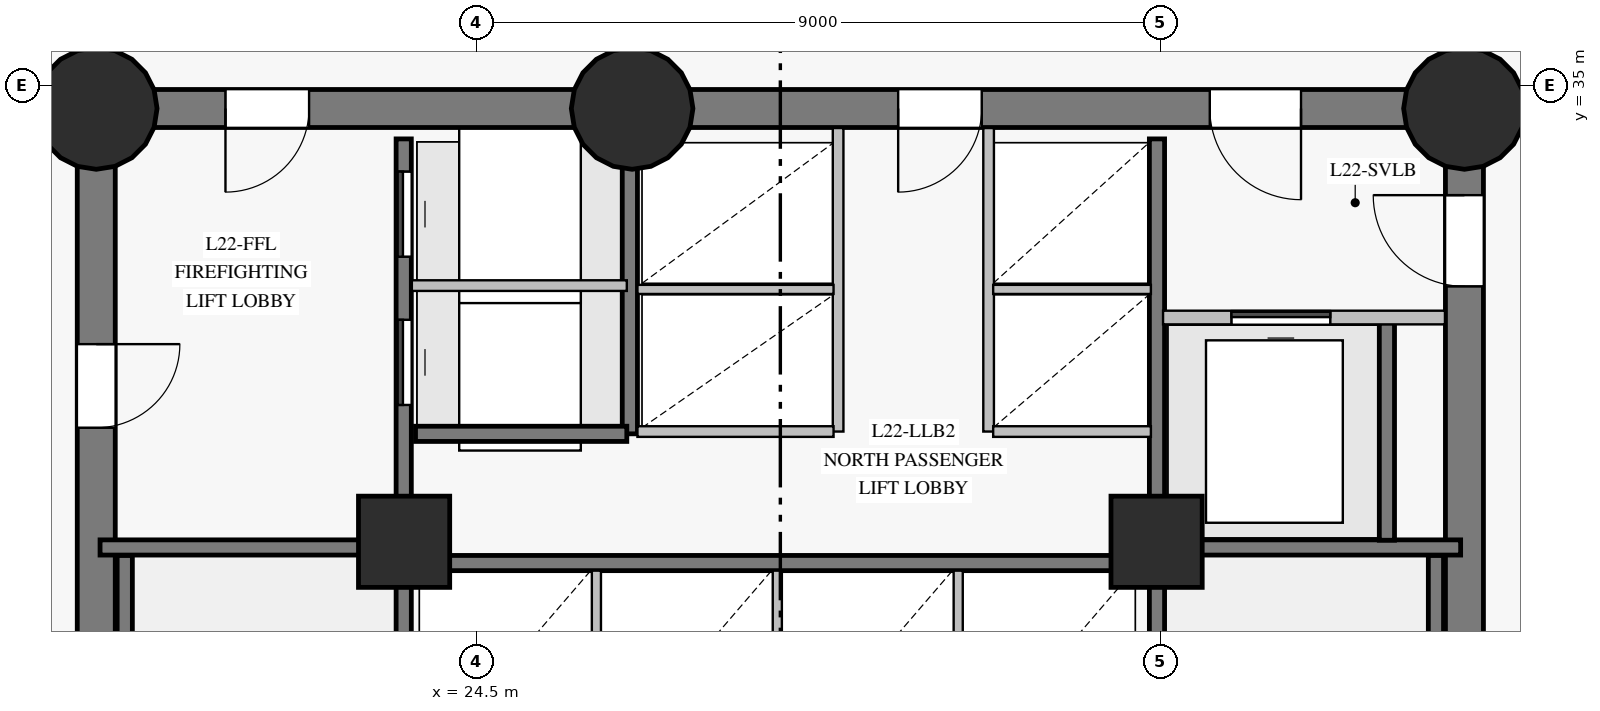
"""IFC4 building model, lengths in metres.
Left out: names, types, materials, properties, quantities, classifications, styles, units other than length and angle.
Written with IfcOpenShell. Run it as: python <this file> out.ifc"""

import sys

from ifc_helpers import new_model, si_unit, direction, frame, frame_2d, origin, origin_with_axes, origin_2d, place, context, subcontext, project, spatial, rectangle, circle, extrude, source, transform, mapped, element, fill, save


model = new_model("IFC4")
c1 = context("Model", 3, precision=1e-05, world=origin(), true_north=direction((0.0, 1.0)))
c2 = subcontext(c1, "Body", "Model", "MODEL_VIEW")
j1 = project(units=[si_unit("LENGTHUNIT", "METRE"), si_unit("PLANEANGLEUNIT", "RADIAN")], contexts=[c1])
p1 = place(None, origin())
s1 = spatial("IfcSite", under=j1, at=p1, CompositionType="ELEMENT")
p2 = place(p1, origin())
s2 = spatial("IfcBuilding", under=s1, at=p2, CompositionType="ELEMENT")
p3 = place(p2, frame((0.0, 0.0, 84.1)))
s3 = spatial("IfcBuildingStorey", under=s2, at=p3, CompositionType="ELEMENT", Elevation=84.1)
p4 = place(p3, frame((37.5, 18.3, 0.0), z_axis=(0.0, 0.0, 1.0), x_axis=(0.0, 1.0, 0.0)))
e1 = element("IfcWall", 1, at=p4, inside=s3, PredefinedType="SHEAR", context=c2, shape_type="SweptSolid", body=[
    extrude(rectangle(XDim=16.4, YDim=0.5, at=frame_2d((8.2, 0.0))), origin(), (0.0, 0.0, 1.0), 3.325),
])
p5 = place(p4, frame((14.06, 0.0, 0.0)))
e2 = element("IfcOpeningElement", 2, at=p5, cuts=e1, PredefinedType="OPENING", context=c2, shape_type="SweptSolid", body=[
    extrude(rectangle(XDim=1.2, YDim=2.15, at=frame_2d((0.6, 1.075))), frame((0.0, 0.26, 0.0), z_axis=(0.0, -1.0, 0.0), x_axis=(1.0, 0.0, 0.0)), (0.0, 0.0, 1.0), 0.52),
])
p6 = place(p3, frame((37.5, 34.7, 0.0), z_axis=(0.0, 0.0, 1.0), x_axis=(-1.0, 0.0, 0.0)))
e3 = element("IfcWall", 3, at=p6, inside=s3, PredefinedType="SHEAR", context=c2, shape_type="SweptSolid", body=[
    extrude(rectangle(XDim=10.95, YDim=0.5, at=frame_2d((5.475, 0.0))), origin(), (0.0, 0.0, 1.0), 3.325),
])
p7 = place(p6, frame((2.15, 0.0, 0.0)))
e4 = element("IfcOpeningElement", 4, at=p7, cuts=e3, PredefinedType="OPENING", context=c2, shape_type="SweptSolid", body=[
    extrude(rectangle(XDim=1.2, YDim=2.15, at=frame_2d((0.6, 1.075))), frame((0.0, 0.26, 0.0), z_axis=(0.0, -1.0, 0.0), x_axis=(1.0, 0.0, 0.0)), (0.0, 0.0, 1.0), 0.52),
])
p8 = place(p6, frame((6.35, 0.0, 0.0)))
e5 = element("IfcOpeningElement", 5, at=p8, cuts=e3, PredefinedType="OPENING", context=c2, shape_type="SweptSolid", body=[
    extrude(rectangle(XDim=1.1, YDim=2.15, at=frame_2d((0.55, 1.075))), frame((0.0, 0.26, 0.0), z_axis=(0.0, -1.0, 0.0), x_axis=(1.0, 0.0, 0.0)), (0.0, 0.0, 1.0), 0.52),
])
p9 = place(p3, frame((26.55, 34.7, 0.0), z_axis=(0.0, 0.0, 1.0), x_axis=(-1.0, 0.0, 0.0)))
e6 = element("IfcWall", 6, at=p9, inside=s3, PredefinedType="SHEAR", context=c2, shape_type="SweptSolid", body=[
    extrude(rectangle(XDim=7.05, YDim=0.5, at=frame_2d((3.525, 0.0))), origin(), (0.0, 0.0, 1.0), 3.325),
])
p10 = place(p9, frame((4.25, 0.0, 0.0)))
e7 = element("IfcOpeningElement", 7, at=p10, cuts=e6, PredefinedType="OPENING", context=c2, shape_type="SweptSolid", body=[
    extrude(rectangle(XDim=1.1, YDim=2.15, at=frame_2d((0.55, 1.075))), frame((0.0, 0.26, 0.0), z_axis=(0.0, -1.0, 0.0), x_axis=(1.0, 0.0, 0.0)), (0.0, 0.0, 1.0), 0.52),
])
p11 = place(p3, frame((19.5, 34.7, 0.0), z_axis=(0.0, 0.0, 1.0), x_axis=(0.0, -1.0, 0.0)))
e8 = element("IfcWall", 8, at=p11, inside=s3, PredefinedType="SHEAR", context=c2, shape_type="SweptSolid", body=[
    extrude(rectangle(XDim=16.4, YDim=0.5, at=frame_2d((8.2, 0.0))), origin(), (0.0, 0.0, 1.0), 3.325),
])
p12 = place(p11, frame((3.1, 0.0, 0.0)))
e9 = element("IfcOpeningElement", 9, at=p12, cuts=e8, PredefinedType="OPENING", context=c2, shape_type="SweptSolid", body=[
    extrude(rectangle(XDim=1.1, YDim=2.15, at=frame_2d((0.55, 1.075))), frame((0.0, 0.26, 0.0), z_axis=(0.0, -1.0, 0.0), x_axis=(1.0, 0.0, 0.0)), (0.0, 0.0, 1.0), 0.52),
])
m1 = source(origin_with_axes(), c2, "Body", "SweptSolid", [
    extrude(circle(Radius=0.8, at=origin_2d()), origin(), (0.0, 0.0, 1.0), 3.6),
])
for number, where, z_axis, x_axis in (
    (10, (19.5, 34.7, 0.0), (0.0, 0.0, 1.0), (1.0, 0.0, 0.0)),
    (11, (26.55, 34.7, 0.0), (0.0, 0.0, 1.0), (1.0, 0.0, 0.0)),
    (12, (37.5, 34.7, 0.0), (0.0, 0.0, 1.0), (1.0, 0.0, 0.0)),
):
    element("IfcColumn", number, at=place(p3, frame(where, z_axis=z_axis, x_axis=x_axis)), inside=s3, PredefinedType="COLUMN", context=c2, shape_type="MappedRepresentation", body=[
        mapped(m1, transform((0.0, 0.0, 0.0), scale=1.0)),
    ])
m2 = source(origin_with_axes(), c2, "Body", "SweptSolid", [
    extrude(rectangle(XDim=1.2, YDim=1.2, at=origin_2d()), origin(), (0.0, 0.0, 1.0), 3.6),
])
for number, where, z_axis, x_axis in (
    (13, (23.55, 29.0, 0.0), (0.0, 0.0, 1.0), (1.0, 0.0, 0.0)),
    (14, (33.45, 29.0, 0.0), (0.0, 0.0, 1.0), (1.0, 0.0, 0.0)),
):
    element("IfcColumn", number, at=place(p3, frame(where, z_axis=z_axis, x_axis=x_axis)), inside=s3, PredefinedType="COLUMN", context=c2, shape_type="MappedRepresentation", body=[
        mapped(m2, transform((0.0, 0.0, 0.0), scale=1.0)),
    ])
p13 = place(p3, frame((23.545, 18.7, 0.0), z_axis=(0.0, 0.0, 1.0), x_axis=(0.0, 1.0, 0.0)))
e15 = element("IfcWall", 15, at=p13, inside=s3, PredefinedType="SHEAR", context=c2, shape_type="SweptSolid", body=[
    extrude(rectangle(XDim=15.6, YDim=0.2, at=frame_2d((7.8, 0.0))), origin(), (0.0, 0.0, 1.0), 3.325),
])
p14 = place(p13, frame((2.75, 0.0, 0.0)))
e16 = element("IfcOpeningElement", 16, at=p14, cuts=e15, PredefinedType="OPENING", context=c2, shape_type="SweptSolid", body=[
    extrude(rectangle(XDim=1.15, YDim=2.15, at=frame_2d((0.575, 1.075))), frame((0.0, 0.11, 0.0), z_axis=(0.0, -1.0, 0.0), x_axis=(1.0, 0.0, 0.0)), (0.0, 0.0, 1.0), 0.22),
])
p15 = place(p13, frame((0.14, 0.0, 0.0)))
e17 = element("IfcOpeningElement", 17, at=p15, cuts=e15, PredefinedType="OPENING", context=c2, shape_type="SweptSolid", body=[
    extrude(rectangle(XDim=0.88, YDim=2.1, at=frame_2d((0.44, 1.05))), frame((0.0, 0.11, 0.0), z_axis=(0.0, -1.0, 0.0), x_axis=(1.0, 0.0, 0.0)), (0.0, 0.0, 1.0), 0.22),
])
p16 = place(p13, frame((1.36, 0.0, 0.0)))
e18 = element("IfcOpeningElement", 18, at=p16, cuts=e15, PredefinedType="OPENING", context=c2, shape_type="SweptSolid", body=[
    extrude(rectangle(XDim=0.88, YDim=2.1, at=frame_2d((0.44, 1.05))), frame((0.0, 0.11, 0.0), z_axis=(0.0, -1.0, 0.0), x_axis=(1.0, 0.0, 0.0)), (0.0, 0.0, 1.0), 0.22),
])
p17 = place(p13, frame((12.1, 0.0, 0.0)))
e19 = element("IfcOpeningElement", 19, at=p17, cuts=e15, PredefinedType="OPENING", context=c2, shape_type="SweptSolid", body=[
    extrude(rectangle(XDim=1.12, YDim=2.15, at=frame_2d((0.56, 1.075))), frame((0.0, 0.11, 0.0), z_axis=(0.0, -1.0, 0.0), x_axis=(1.0, 0.0, 0.0)), (0.0, 0.0, 1.0), 0.22),
])
p18 = place(p13, frame((14.05, 0.0, 0.0)))
e20 = element("IfcOpeningElement", 20, at=p18, cuts=e15, PredefinedType="OPENING", context=c2, shape_type="SweptSolid", body=[
    extrude(rectangle(XDim=1.12, YDim=2.15, at=frame_2d((0.56, 1.075))), frame((0.0, 0.11, 0.0), z_axis=(0.0, -1.0, 0.0), x_axis=(1.0, 0.0, 0.0)), (0.0, 0.0, 1.0), 0.22),
])
p19 = place(p3, frame((33.455, 18.7, 0.0), z_axis=(0.0, 0.0, 1.0), x_axis=(0.0, 1.0, 0.0)))
e21 = element("IfcWall", 21, at=p19, inside=s3, PredefinedType="SHEAR", context=c2, shape_type="SweptSolid", body=[
    extrude(rectangle(XDim=15.6, YDim=0.2, at=frame_2d((7.8, 0.0))), origin(), (0.0, 0.0, 1.0), 3.325),
])
p20 = place(p19, frame((2.75, 0.0, 0.0)))
e22 = element("IfcOpeningElement", 22, at=p20, cuts=e21, PredefinedType="OPENING", context=c2, shape_type="SweptSolid", body=[
    extrude(rectangle(XDim=1.15, YDim=2.15, at=frame_2d((0.575, 1.075))), frame((0.0, 0.11, 0.0), z_axis=(0.0, -1.0, 0.0), x_axis=(1.0, 0.0, 0.0)), (0.0, 0.0, 1.0), 0.22),
])
p21 = place(p19, frame((0.55, 0.0, 0.0)))
e23 = element("IfcOpeningElement", 23, at=p21, cuts=e21, PredefinedType="OPENING", context=c2, shape_type="SweptSolid", body=[
    extrude(rectangle(XDim=0.94, YDim=2.1, at=frame_2d((0.47, 1.05))), frame((0.0, 0.11, 0.0), z_axis=(0.0, -1.0, 0.0), x_axis=(1.0, 0.0, 0.0)), (0.0, 0.0, 1.0), 0.22),
])
p22 = place(p3, frame((23.7, 28.72, 0.0), z_axis=(0.0, 0.0, 1.0), x_axis=(1.0, 0.0, 0.0)))
e24 = element("IfcWall", 24, at=p22, inside=s3, PredefinedType="SHEAR", context=c2, shape_type="SweptSolid", body=[
    extrude(rectangle(XDim=9.6, YDim=0.2, at=frame_2d((4.8, 0.0))), origin(), (0.0, 0.0, 1.0), 3.325),
])
for number, where, z_axis, x_axis in (
    (25, (19.875, 21.32, 0.0), (0.0, 0.0, 1.0), (0.0, 1.0, 0.0)),
    (26, (37.125, 21.32, 0.0), (0.0, 0.0, 1.0), (0.0, 1.0, 0.0)),
):
    element("IfcWall", number, at=place(p3, frame(where, z_axis=z_axis, x_axis=x_axis)), inside=s3, PredefinedType="SHEAR", context=c2, shape_type="SweptSolid", body=[
        extrude(rectangle(XDim=7.5, YDim=0.2, at=frame_2d((3.75, 0.0))), origin(), (0.0, 0.0, 1.0), 3.325),
    ])
for number, where, z_axis, x_axis in (
    (27, (33.455, 28.925, 0.0), (0.0, 0.0, 1.0), (1.0, 0.0, 0.0)),
    (28, (19.55, 28.925, 0.0), (0.0, 0.0, 1.0), (1.0, 0.0, 0.0)),
):
    element("IfcWall", number, at=place(p3, frame(where, z_axis=z_axis, x_axis=x_axis)), inside=s3, PredefinedType="SHEAR", context=c2, shape_type="SweptSolid", body=[
        extrude(rectangle(XDim=3.995, YDim=0.2, at=frame_2d((1.998, 0.0))), origin(), (0.0, 0.0, 1.0), 3.325),
    ])
p23 = place(p3, frame((26.52, 30.42, 0.0), z_axis=(0.0, 0.0, 1.0), x_axis=(0.0, 1.0, 0.0)))
e29 = element("IfcWall", 29, at=p23, inside=s3, PredefinedType="SHEAR", context=c2, shape_type="SweptSolid", body=[
    extrude(rectangle(XDim=3.86, YDim=0.2, at=frame_2d((1.93, 0.0))), origin(), (0.0, 0.0, 1.0), 3.325),
])
p24 = place(p3, frame((36.48, 29.02, 0.0), z_axis=(0.0, 0.0, 1.0), x_axis=(0.0, 1.0, 0.0)))
e30 = element("IfcWall", 30, at=p24, inside=s3, PredefinedType="SHEAR", context=c2, shape_type="SweptSolid", body=[
    extrude(rectangle(XDim=2.86, YDim=0.2, at=frame_2d((1.43, 0.0))), origin(), (0.0, 0.0, 1.0), 3.325),
])
p25 = place(p3, frame((23.7, 30.42, 0.0), z_axis=(0.0, 0.0, 1.0), x_axis=(1.0, 0.0, 0.0)))
e31 = element("IfcWall", 31, at=p25, inside=s3, PredefinedType="SHEAR", context=c2, shape_type="SweptSolid", body=[
    extrude(rectangle(XDim=2.78, YDim=0.2, at=frame_2d((1.39, 0.0))), origin(), (0.0, 0.0, 1.0), 3.325),
])
for number, where, z_axis, x_axis in (
    (32, (29.26, 30.45, 0.0), (0.0, 0.0, 1.0), (0.0, 1.0, 0.0)),
    (33, (31.24, 30.45, 0.0), (0.0, 0.0, 1.0), (0.0, 1.0, 0.0)),
):
    element("IfcWall", number, at=place(p3, frame(where, z_axis=z_axis, x_axis=x_axis)), inside=s3, PredefinedType="PARTITIONING", context=c2, shape_type="SweptSolid", body=[
        extrude(rectangle(XDim=3.993, YDim=0.14, at=frame_2d((1.997, 0.0))), origin(), (0.0, 0.0, 1.0), 3.325),
    ])
p26 = place(p3, frame((33.535, 31.95, 0.0), z_axis=(0.0, 0.0, 1.0), x_axis=(1.0, 0.0, 0.0)))
e34 = element("IfcWall", 34, at=p26, inside=s3, PredefinedType="PARTITIONING", context=c2, shape_type="SweptSolid", body=[
    extrude(rectangle(XDim=3.709, YDim=0.18, at=frame_2d((1.854, 0.0))), origin(), (0.0, 0.0, 1.0), 3.325),
])
p27 = place(p26, frame((0.9, 0.0, 0.0)))
e35 = element("IfcOpeningElement", 35, at=p27, cuts=e34, PredefinedType="OPENING", context=c2, shape_type="SweptSolid", body=[
    extrude(rectangle(XDim=1.3, YDim=2.2, at=frame_2d((0.65, 1.1))), frame((0.0, 0.1, 0.0), z_axis=(0.0, -1.0, 0.0), x_axis=(1.0, 0.0, 0.0)), (0.0, 0.0, 1.0), 0.2),
])
p28 = place(p3, frame((23.652, 32.37, 0.0), z_axis=(0.0, 0.0, 1.0), x_axis=(1.0, 0.0, 0.0)))
e36 = element("IfcWall", 36, at=p28, inside=s3, PredefinedType="PARTITIONING", context=c2, shape_type="SweptSolid", body=[
    extrude(rectangle(XDim=2.828, YDim=0.14, at=frame_2d((1.414, 0.0))), origin(), (0.0, 0.0, 1.0), 3.325),
])
for number, where, z_axis, x_axis in (
    (37, (26.08, 26.02, 0.0), (0.0, 0.0, 1.0), (0.0, 1.0, 0.0)),
    (38, (28.46, 26.02, 0.0), (0.0, 0.0, 1.0), (0.0, 1.0, 0.0)),
    (39, (30.84, 26.02, 0.0), (0.0, 0.0, 1.0), (0.0, 1.0, 0.0)),
):
    element("IfcWall", number, at=place(p3, frame(where, z_axis=z_axis, x_axis=x_axis)), inside=s3, PredefinedType="PARTITIONING", context=c2, shape_type="SweptSolid", body=[
        extrude(rectangle(XDim=2.6, YDim=0.12, at=frame_2d((1.3, 0.0))), origin(), (0.0, 0.0, 1.0), 3.325),
    ])
p29 = place(p3, frame((26.62, 30.45, 0.0), z_axis=(0.0, 0.0, 1.0), x_axis=(1.0, 0.0, 0.0)))
e40 = element("IfcWall", 40, at=p29, inside=s3, PredefinedType="PARTITIONING", context=c2, shape_type="SweptSolid", body=[
    extrude(rectangle(XDim=2.58, YDim=0.14, at=frame_2d((1.29, 0.0))), origin(), (0.0, 0.0, 1.0), 3.325),
])
p30 = place(p3, frame((26.62, 32.32, 0.0), z_axis=(0.0, 0.0, 1.0), x_axis=(1.0, 0.0, 0.0)))
e41 = element("IfcWall", 41, at=p30, inside=s3, PredefinedType="PARTITIONING", context=c2, shape_type="SweptSolid", body=[
    extrude(rectangle(XDim=2.58, YDim=0.12, at=frame_2d((1.29, 0.0))), origin(), (0.0, 0.0, 1.0), 3.325),
])
p31 = place(p3, frame((31.3, 30.45, 0.0), z_axis=(0.0, 0.0, 1.0), x_axis=(1.0, 0.0, 0.0)))
e42 = element("IfcWall", 42, at=p31, inside=s3, PredefinedType="PARTITIONING", context=c2, shape_type="SweptSolid", body=[
    extrude(rectangle(XDim=2.075, YDim=0.14, at=frame_2d((1.038, 0.0))), origin(), (0.0, 0.0, 1.0), 3.325),
])
p32 = place(p3, frame((31.3, 32.32, 0.0), z_axis=(0.0, 0.0, 1.0), x_axis=(1.0, 0.0, 0.0)))
e43 = element("IfcWall", 43, at=p32, inside=s3, PredefinedType="PARTITIONING", context=c2, shape_type="SweptSolid", body=[
    extrude(rectangle(XDim=2.075, YDim=0.12, at=frame_2d((1.038, 0.0))), origin(), (0.0, 0.0, 1.0), 3.325),
])
m3 = source(origin_with_axes(), c2, "Body", "SweptSolid", [
    extrude(rectangle(XDim=1.1, YDim=2.15, at=frame_2d((0.55, 1.075))), frame((0.0, 0.025, 0.0), z_axis=(0.0, -1.0, 0.0), x_axis=(1.0, 0.0, 0.0)), (0.0, 0.0, 1.0), 0.05),
])
p33 = place(p10, origin())
e44 = element("IfcDoor", 44, at=p33, inside=s3, OperationType="SINGLE_SWING_RIGHT", PredefinedType="DOOR", context=c2, shape_type="MappedRepresentation", body=[
    mapped(m3, transform((0.0, 0.0, 0.0), scale=1.0)),
])
fill(e7, e44)
p34 = place(p12, origin())
e45 = element("IfcDoor", 45, at=p34, inside=s3, OperationType="SINGLE_SWING_LEFT", PredefinedType="DOOR", context=c2, shape_type="MappedRepresentation", body=[
    mapped(m3, transform((0.0, 0.0, 0.0), scale=1.0)),
])
fill(e9, e45)
m4 = source(origin_with_axes(), c2, "Body", "SweptSolid", [
    extrude(rectangle(XDim=1.2, YDim=2.15, at=frame_2d((0.6, 1.075))), frame((0.0, 0.025, 0.0), z_axis=(0.0, -1.0, 0.0), x_axis=(1.0, 0.0, 0.0)), (0.0, 0.0, 1.0), 0.05),
])
p35 = place(p5, origin())
e46 = element("IfcDoor", 46, at=p35, inside=s3, OperationType="SINGLE_SWING_RIGHT", PredefinedType="DOOR", context=c2, shape_type="MappedRepresentation", body=[
    mapped(m4, transform((0.0, 0.0, 0.0), scale=1.0)),
])
fill(e2, e46)
p36 = place(p7, origin())
e47 = element("IfcDoor", 47, at=p36, inside=s3, OperationType="SINGLE_SWING_LEFT", PredefinedType="DOOR", context=c2, shape_type="MappedRepresentation", body=[
    mapped(m4, transform((0.0, 0.0, 0.0), scale=1.0)),
])
fill(e4, e47)
m5 = source(origin_with_axes(), c2, "Body", "SweptSolid", [
    extrude(rectangle(XDim=1.3, YDim=2.2, at=frame_2d((0.65, 1.1))), frame((0.0, 0.025, 0.0), z_axis=(0.0, -1.0, 0.0), x_axis=(1.0, 0.0, 0.0)), (0.0, 0.0, 1.0), 0.05),
])
p37 = place(p27, origin())
e48 = element("IfcDoor", 48, at=p37, inside=s3, OperationType="SLIDING_TO_LEFT", PredefinedType="DOOR", context=c2, shape_type="MappedRepresentation", body=[
    mapped(m5, transform((0.0, 0.0, 0.0), scale=1.0)),
])
fill(e35, e48)
p38 = place(p8, origin())
e49 = element("IfcDoor", 49, at=p38, inside=s3, OperationType="SINGLE_SWING_RIGHT", PredefinedType="DOOR", context=c2, shape_type="MappedRepresentation", body=[
    mapped(m3, transform((0.0, 0.0, 0.0), scale=1.0)),
])
fill(e5, e49)
m6 = source(origin_with_axes(), c2, "Body", "SweptSolid", [
    extrude(rectangle(XDim=1.12, YDim=2.15, at=frame_2d((0.56, 1.075))), frame((0.0, 0.025, 0.0), z_axis=(0.0, -1.0, 0.0), x_axis=(1.0, 0.0, 0.0)), (0.0, 0.0, 1.0), 0.05),
])
p39 = place(p17, origin())
e50 = element("IfcDoor", 50, at=p39, inside=s3, OperationType="SLIDING_TO_LEFT", PredefinedType="DOOR", context=c2, shape_type="MappedRepresentation", body=[
    mapped(m6, transform((0.0, 0.0, 0.0), scale=1.0)),
])
fill(e19, e50)
p40 = place(p18, origin())
e51 = element("IfcDoor", 51, at=p40, inside=s3, OperationType="SLIDING_TO_RIGHT", PredefinedType="DOOR", context=c2, shape_type="MappedRepresentation", body=[
    mapped(m6, transform((0.0, 0.0, 0.0), scale=1.0)),
])
fill(e20, e51)
save(model, sys.argv[1])
